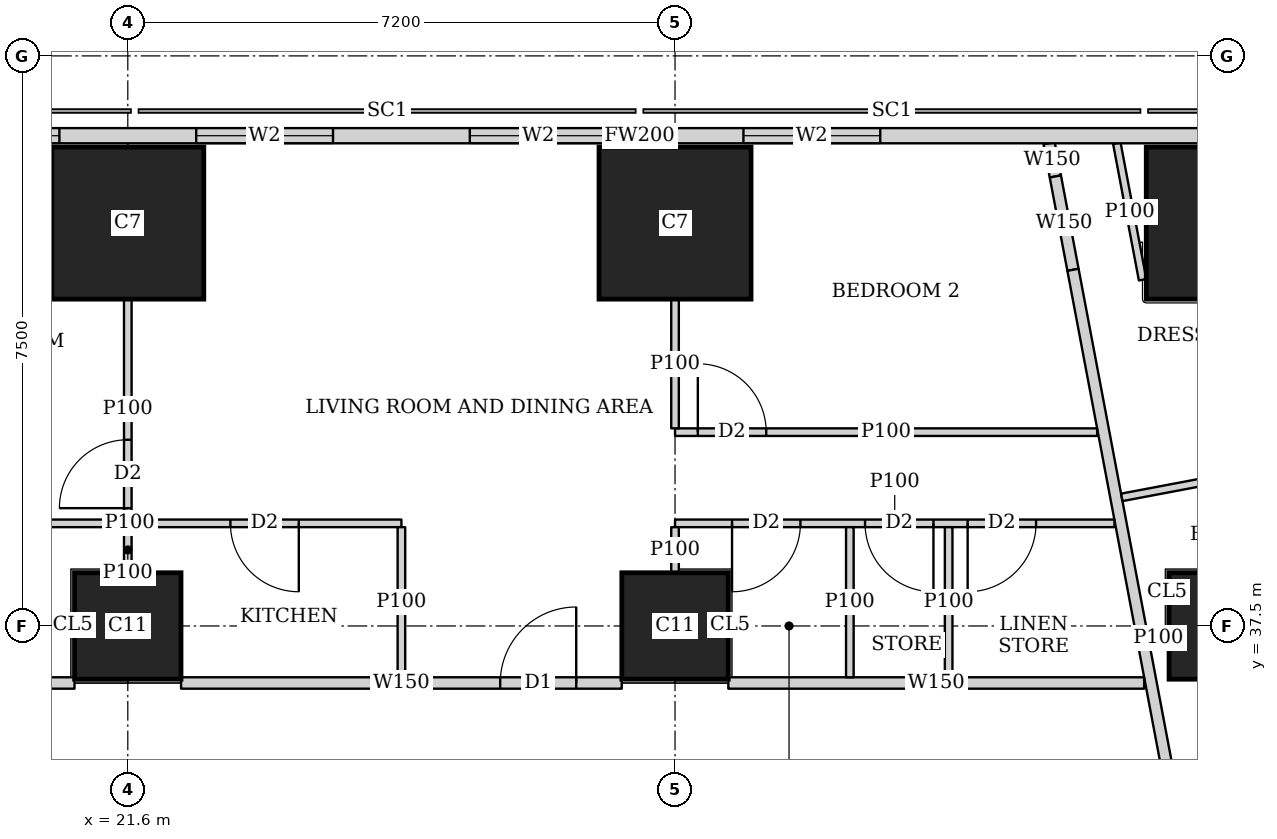
"""IFC4 building model, lengths in metres.
Left out: names, types, materials, properties, quantities, classifications, styles, units other than length and angle.
Written with IfcOpenShell. Run it as: python <this file> out.ifc"""

import sys

from ifc_helpers import new_model, si_unit, direction, frame, frame_2d, origin, origin_2d, place, context, subcontext, project, spatial, rectangle, extrude, element, fill, save


model = new_model("IFC4")
c1 = context("Model", 3, precision=1e-05, world=origin(), true_north=direction((0.0, 1.0)))
c2 = subcontext(c1, "Body", "Model", "MODEL_VIEW")
j1 = project(units=[si_unit("LENGTHUNIT", "METRE"), si_unit("PLANEANGLEUNIT", "RADIAN")], contexts=[c1])
p1 = place(None, origin())
s1 = spatial("IfcSite", under=j1, at=p1, CompositionType="ELEMENT")
p2 = place(p1, origin())
s2 = spatial("IfcBuilding", under=s1, at=p2, CompositionType="ELEMENT")
p3 = place(p2, frame((0.0, 0.0, 289.1)))
s3 = spatial("IfcBuildingStorey", under=s2, at=p3, CompositionType="ELEMENT", Elevation=289.1)
for number, where, z_axis, x_axis in (
    (1, (21.6, 37.5, 0.0), (0.0, 0.0, 1.0), (1.0, 0.0, 0.0)),
    (2, (28.8, 37.5, 0.0), (0.0, 0.0, 1.0), (1.0, 0.0, 0.0)),
    (3, (36.0, 37.5, 0.0), (0.0, 0.0, 1.0), (1.0, 0.0, 0.0)),
):
    element("IfcColumn", number, at=place(p3, frame(where, z_axis=z_axis, x_axis=x_axis)), inside=s3, PredefinedType="COLUMN", context=c2, shape_type="SweptSolid", body=[
        extrude(rectangle(XDim=1.4, YDim=1.4, at=origin_2d()), origin(), (0.0, 0.0, 1.0), 3.75),
    ])
for number, where, z_axis, x_axis in (
    (4, (21.6, 42.8, 0.0), (0.0, 0.0, 1.0), (1.0, 0.0, 0.0)),
    (5, (28.8, 42.8, 0.0), (0.0, 0.0, 1.0), (1.0, 0.0, 0.0)),
    (6, (36.0, 42.8, 0.0), (0.0, 0.0, 1.0), (1.0, 0.0, 0.0)),
):
    element("IfcColumn", number, at=place(p3, frame(where, z_axis=z_axis, x_axis=x_axis)), inside=s3, PredefinedType="COLUMN", context=c2, shape_type="SweptSolid", body=[
        extrude(rectangle(XDim=2.0, YDim=2.0, at=origin_2d()), origin(), (0.0, 0.0, 1.0), 3.75),
    ])
p4 = place(p3, frame((42.103, 43.95, 0.0), z_axis=(0.0, 0.0, 1.0), x_axis=(-1.0, 0.0, 0.0)))
e7 = element("IfcWall", 7, at=p4, inside=s3, PredefinedType="SOLIDWALL", context=c2, shape_type="SweptSolid", body=[
    extrude(rectangle(XDim=27.54, YDim=0.2, at=frame_2d((13.77, 0.0))), origin(), (0.0, 0.0, 1.0), 3.5),
])
p5 = place(p4, frame((10.603, 0.0, 0.9)))
e8 = element("IfcOpeningElement", 8, at=p5, cuts=e7, PredefinedType="OPENING", context=c2, shape_type="SweptSolid", body=[
    extrude(rectangle(XDim=1.8, YDim=1.5, at=frame_2d((0.9, 0.75))), frame((0.0, 0.11, 0.0), z_axis=(0.0, -1.0, 0.0), x_axis=(1.0, 0.0, 0.0)), (0.0, 0.0, 1.0), 0.22),
])
p6 = place(p4, frame((14.203, 0.0, 0.9)))
e9 = element("IfcOpeningElement", 9, at=p6, cuts=e7, PredefinedType="OPENING", context=c2, shape_type="SweptSolid", body=[
    extrude(rectangle(XDim=1.8, YDim=1.5, at=frame_2d((0.9, 0.75))), frame((0.0, 0.11, 0.0), z_axis=(0.0, -1.0, 0.0), x_axis=(1.0, 0.0, 0.0)), (0.0, 0.0, 1.0), 0.22),
])
p7 = place(p4, frame((17.803, 0.0, 0.9)))
e10 = element("IfcOpeningElement", 10, at=p7, cuts=e7, PredefinedType="OPENING", context=c2, shape_type="SweptSolid", body=[
    extrude(rectangle(XDim=1.8, YDim=1.5, at=frame_2d((0.9, 0.75))), frame((0.0, 0.11, 0.0), z_axis=(0.0, -1.0, 0.0), x_axis=(1.0, 0.0, 0.0)), (0.0, 0.0, 1.0), 0.22),
])
p8 = place(p4, frame((21.403, 0.0, 0.9)))
e11 = element("IfcOpeningElement", 11, at=p8, cuts=e7, PredefinedType="OPENING", context=c2, shape_type="SweptSolid", body=[
    extrude(rectangle(XDim=1.8, YDim=1.5, at=frame_2d((0.9, 0.75))), frame((0.0, 0.11, 0.0), z_axis=(0.0, -1.0, 0.0), x_axis=(1.0, 0.0, 0.0)), (0.0, 0.0, 1.0), 0.22),
])
p9 = place(p3, frame((16.001, 36.75, 0.0), z_axis=(0.0, 0.0, 1.0), x_axis=(1.0, 0.0, 0.0)))
e12 = element("IfcWall", 12, at=p9, inside=s3, PredefinedType="SOLIDWALL", context=c2, shape_type="SweptSolid", body=[
    extrude(rectangle(XDim=4.898, YDim=0.15, at=frame_2d((2.449, 0.0))), origin(), (0.0, 0.0, 1.0), 3.5),
])
p10 = place(p3, frame((22.301, 36.75, 0.0), z_axis=(0.0, 0.0, 1.0), x_axis=(1.0, 0.0, 0.0)))
e13 = element("IfcWall", 13, at=p10, inside=s3, PredefinedType="SOLIDWALL", context=c2, shape_type="SweptSolid", body=[
    extrude(rectangle(XDim=5.798, YDim=0.15, at=frame_2d((2.899, 0.0))), origin(), (0.0, 0.0, 1.0), 3.5),
])
p11 = place(p10, frame((4.199, 0.0, 0.0)))
e14 = element("IfcOpeningElement", 14, at=p11, cuts=e13, PredefinedType="OPENING", context=c2, shape_type="SweptSolid", body=[
    extrude(rectangle(XDim=1.0, YDim=2.1, at=frame_2d((0.5, 1.05))), frame((0.0, 0.085, 0.0), z_axis=(0.0, -1.0, 0.0), x_axis=(1.0, 0.0, 0.0)), (0.0, 0.0, 1.0), 0.17),
])
p12 = place(p3, frame((29.501, 36.75, 0.0), z_axis=(0.0, 0.0, 1.0), x_axis=(1.0, 0.0, 0.0)))
e15 = element("IfcWall", 15, at=p12, inside=s3, PredefinedType="SOLIDWALL", context=c2, shape_type="SweptSolid", body=[
    extrude(rectangle(XDim=5.471, YDim=0.15, at=frame_2d((2.735, 0.0))), origin(), (0.0, 0.0, 1.0), 3.5),
])
p13 = place(p3, frame((33.722, 43.85, 0.0), z_axis=(0.0, 0.0, 1.0), x_axis=(0.184886516626, -0.982759877066, 0.0)))
e16 = element("IfcWall", 16, at=p13, inside=s3, PredefinedType="SOLIDWALL", context=c2, shape_type="SweptSolid", body=[
    extrude(rectangle(XDim=0.444, YDim=0.15, at=frame_2d((0.222, 0.0))), origin(), (0.0, 0.0, 1.0), 3.5),
])
p14 = place(p3, frame((33.804, 43.414, 0.0), z_axis=(0.0, 0.0, 1.0), x_axis=(0.185585816539, -0.982628060204, 0.0)))
e17 = element("IfcWall", 17, at=p14, inside=s3, PredefinedType="SOLIDWALL", context=c2, shape_type="SweptSolid", body=[
    extrude(rectangle(XDim=1.25, YDim=0.15, at=frame_2d((0.625, 0.0))), origin(), (0.0, 0.0, 1.0), 2.05),
])
p15 = place(p3, frame((34.036, 42.186, 0.0), z_axis=(0.0, 0.0, 1.0), x_axis=(0.185593518645, -0.9826266055, 0.0)))
e18 = element("IfcWall", 18, at=p15, inside=s3, PredefinedType="SOLIDWALL", context=c2, shape_type="SweptSolid", body=[
    extrude(rectangle(XDim=35.961, YDim=0.15, at=frame_2d((17.98, 0.0))), origin(), (0.0, 0.0, 1.0), 2.5),
])
p16 = place(p15, frame((19.345, 0.0, 0.0)))
e19 = element("IfcOpeningElement", 19, at=p16, cuts=e18, PredefinedType="OPENING", context=c2, shape_type="SweptSolid", body=[
    extrude(rectangle(XDim=1.0, YDim=2.1, at=frame_2d((0.5, 1.05))), frame((0.0, 0.085, 0.0), z_axis=(0.0, -1.0, 0.0), x_axis=(1.0, 0.0, 0.0)), (0.0, 0.0, 1.0), 0.17),
])
p17 = place(p15, frame((33.774, 0.0, 0.0)))
e20 = element("IfcOpeningElement", 20, at=p17, cuts=e18, PredefinedType="OPENING", context=c2, shape_type="SweptSolid", body=[
    extrude(rectangle(XDim=1.0, YDim=2.1, at=frame_2d((0.5, 1.05))), frame((0.0, 0.085, 0.0), z_axis=(0.0, -1.0, 0.0), x_axis=(1.0, 0.0, 0.0)), (0.0, 0.0, 1.0), 0.17),
])
p18 = place(p3, frame((34.952, 42.055, 0.0), z_axis=(0.0, 0.0, 1.0), x_axis=(-0.185490642006, 0.98264603074, 0.0)))
e21 = element("IfcWall", 21, at=p18, inside=s3, PredefinedType="PARTITIONING", context=c2, shape_type="SweptSolid", body=[
    extrude(rectangle(XDim=1.827, YDim=0.1, at=frame_2d((0.914, 0.0))), origin(), (0.0, 0.0, 1.0), 2.05),
])
p19 = place(p3, frame((37.896, 39.8, 0.0), z_axis=(0.0, 0.0, 1.0), x_axis=(-0.982607026909, -0.185697147715, 0.0)))
e22 = element("IfcWall", 22, at=p19, inside=s3, PredefinedType="PARTITIONING", context=c2, shape_type="SweptSolid", body=[
    extrude(rectangle(XDim=3.275, YDim=0.1, at=frame_2d((1.637, 0.0))), origin(), (0.0, 0.0, 1.0), 3.5),
])
p20 = place(p3, frame((35.29, 37.366, 0.0), z_axis=(0.0, 0.0, 1.0), x_axis=(-0.982395465615, -0.18681313963, 0.0)))
e23 = element("IfcWall", 23, at=p20, inside=s3, PredefinedType="PARTITIONING", context=c2, shape_type="SweptSolid", body=[
    extrude(rectangle(XDim=0.263, YDim=0.1, at=frame_2d((0.131, 0.0))), origin(), (0.0, 0.0, 1.0), 3.5),
])
p21 = place(p3, frame((21.6, 38.9, 0.0), z_axis=(0.0, 0.0, 1.0), x_axis=(0.0, 1.0, 0.0)))
e24 = element("IfcWall", 24, at=p21, inside=s3, PredefinedType="PARTITIONING", context=c2, shape_type="SweptSolid", body=[
    extrude(rectangle(XDim=2.899, YDim=0.1, at=frame_2d((1.45, 0.0))), origin(), (0.0, 0.0, 1.0), 3.5),
])
p22 = place(p21, frame((0.15, 0.0, 0.0)))
e25 = element("IfcOpeningElement", 25, at=p22, cuts=e24, PredefinedType="OPENING", context=c2, shape_type="SweptSolid", body=[
    extrude(rectangle(XDim=0.9, YDim=2.1, at=frame_2d((0.45, 1.05))), frame((0.0, 0.06, 0.0), z_axis=(0.0, -1.0, 0.0), x_axis=(1.0, 0.0, 0.0)), (0.0, 0.0, 1.0), 0.12),
])
p23 = place(p3, frame((28.8, 40.1, 0.0), z_axis=(0.0, 0.0, 1.0), x_axis=(0.0, 1.0, 0.0)))
e26 = element("IfcWall", 26, at=p23, inside=s3, PredefinedType="PARTITIONING", context=c2, shape_type="SweptSolid", body=[
    extrude(rectangle(XDim=1.699, YDim=0.1, at=frame_2d((0.85, 0.0))), origin(), (0.0, 0.0, 1.0), 3.5),
])
p24 = place(p3, frame((21.6, 38.201, 0.0), z_axis=(0.0, 0.0, 1.0), x_axis=(0.0, 1.0, 0.0)))
e27 = element("IfcWall", 27, at=p24, inside=s3, PredefinedType="PARTITIONING", context=c2, shape_type="SweptSolid", body=[
    extrude(rectangle(XDim=0.599, YDim=0.1, at=frame_2d((0.3, 0.0))), origin(), (0.0, 0.0, 1.0), 3.5),
])
p25 = place(p3, frame((25.2, 36.825, 0.0), z_axis=(0.0, 0.0, 1.0), x_axis=(0.0, 1.0, 0.0)))
e28 = element("IfcWall", 28, at=p25, inside=s3, PredefinedType="PARTITIONING", context=c2, shape_type="SweptSolid", body=[
    extrude(rectangle(XDim=1.975, YDim=0.1, at=frame_2d((0.988, 0.0))), origin(), (0.0, 0.0, 1.0), 3.5),
])
p26 = place(p3, frame((28.8, 38.201, 0.0), z_axis=(0.0, 0.0, 1.0), x_axis=(0.0, 1.0, 0.0)))
e29 = element("IfcWall", 29, at=p26, inside=s3, PredefinedType="PARTITIONING", context=c2, shape_type="SweptSolid", body=[
    extrude(rectangle(XDim=0.599, YDim=0.1, at=frame_2d((0.3, 0.0))), origin(), (0.0, 0.0, 1.0), 3.5),
])
for number, where, z_axis, x_axis in (
    (30, (32.4, 36.825, 0.0), (0.0, 0.0, 1.0), (0.0, 1.0, 0.0)),
    (31, (31.1, 36.825, 0.0), (0.0, 0.0, 1.0), (0.0, 1.0, 0.0)),
):
    element("IfcWall", number, at=place(p3, frame(where, z_axis=z_axis, x_axis=x_axis)), inside=s3, PredefinedType="PARTITIONING", context=c2, shape_type="SweptSolid", body=[
        extrude(rectangle(XDim=1.975, YDim=0.1, at=frame_2d((0.988, 0.0))), origin(), (0.0, 0.0, 1.0), 3.5),
    ])
p27 = place(p3, frame((18.05, 38.85, 0.0), z_axis=(0.0, 0.0, 1.0), x_axis=(1.0, 0.0, 0.0)))
e32 = element("IfcWall", 32, at=p27, inside=s3, PredefinedType="PARTITIONING", context=c2, shape_type="SweptSolid", body=[
    extrude(rectangle(XDim=7.15, YDim=0.1, at=frame_2d((3.575, 0.0))), origin(), (0.0, 0.0, 1.0), 3.5),
])
p28 = place(p27, frame((1.3, 0.0, 0.0)))
e33 = element("IfcOpeningElement", 33, at=p28, cuts=e32, PredefinedType="OPENING", context=c2, shape_type="SweptSolid", body=[
    extrude(rectangle(XDim=0.9, YDim=2.1, at=frame_2d((0.45, 1.05))), frame((0.0, 0.06, 0.0), z_axis=(0.0, -1.0, 0.0), x_axis=(1.0, 0.0, 0.0)), (0.0, 0.0, 1.0), 0.12),
])
p29 = place(p27, frame((4.9, 0.0, 0.0)))
e34 = element("IfcOpeningElement", 34, at=p29, cuts=e32, PredefinedType="OPENING", context=c2, shape_type="SweptSolid", body=[
    extrude(rectangle(XDim=0.9, YDim=2.1, at=frame_2d((0.45, 1.05))), frame((0.0, 0.06, 0.0), z_axis=(0.0, -1.0, 0.0), x_axis=(1.0, 0.0, 0.0)), (0.0, 0.0, 1.0), 0.12),
])
p30 = place(p3, frame((28.8, 38.85, 0.0), z_axis=(0.0, 0.0, 1.0), x_axis=(1.0, 0.0, 0.0)))
e35 = element("IfcWall", 35, at=p30, inside=s3, PredefinedType="PARTITIONING", context=c2, shape_type="SweptSolid", body=[
    extrude(rectangle(XDim=5.781, YDim=0.1, at=frame_2d((2.891, 0.0))), origin(), (0.0, 0.0, 1.0), 3.5),
])
p31 = place(p30, frame((0.75, 0.0, 0.0)))
e36 = element("IfcOpeningElement", 36, at=p31, cuts=e35, PredefinedType="OPENING", context=c2, shape_type="SweptSolid", body=[
    extrude(rectangle(XDim=0.9, YDim=2.1, at=frame_2d((0.45, 1.05))), frame((0.0, 0.06, 0.0), z_axis=(0.0, -1.0, 0.0), x_axis=(1.0, 0.0, 0.0)), (0.0, 0.0, 1.0), 0.12),
])
p32 = place(p30, frame((2.5, 0.0, 0.0)))
e37 = element("IfcOpeningElement", 37, at=p32, cuts=e35, PredefinedType="OPENING", context=c2, shape_type="SweptSolid", body=[
    extrude(rectangle(XDim=0.9, YDim=2.1, at=frame_2d((0.45, 1.05))), frame((0.0, 0.06, 0.0), z_axis=(0.0, -1.0, 0.0), x_axis=(1.0, 0.0, 0.0)), (0.0, 0.0, 1.0), 0.12),
])
p33 = place(p30, frame((3.85, 0.0, 0.0)))
e38 = element("IfcOpeningElement", 38, at=p33, cuts=e35, PredefinedType="OPENING", context=c2, shape_type="SweptSolid", body=[
    extrude(rectangle(XDim=0.9, YDim=2.1, at=frame_2d((0.45, 1.05))), frame((0.0, 0.06, 0.0), z_axis=(0.0, -1.0, 0.0), x_axis=(1.0, 0.0, 0.0)), (0.0, 0.0, 1.0), 0.12),
])
p34 = place(p3, frame((28.8, 40.05, 0.0), z_axis=(0.0, 0.0, 1.0), x_axis=(1.0, 0.0, 0.0)))
e39 = element("IfcWall", 39, at=p34, inside=s3, PredefinedType="PARTITIONING", context=c2, shape_type="SweptSolid", body=[
    extrude(rectangle(XDim=5.554, YDim=0.1, at=frame_2d((2.777, 0.0))), origin(), (0.0, 0.0, 1.0), 3.5),
])
p35 = place(p34, frame((0.3, 0.0, 0.0)))
e40 = element("IfcOpeningElement", 40, at=p35, cuts=e39, PredefinedType="OPENING", context=c2, shape_type="SweptSolid", body=[
    extrude(rectangle(XDim=0.9, YDim=2.1, at=frame_2d((0.45, 1.05))), frame((0.0, 0.06, 0.0), z_axis=(0.0, -1.0, 0.0), x_axis=(1.0, 0.0, 0.0)), (0.0, 0.0, 1.0), 0.12),
])
p36 = place(p5, origin())
e41 = element("IfcWindow", 41, at=p36, inside=s3, PartitioningType="SINGLE_PANEL", PredefinedType="WINDOW", context=c2, shape_type="SweptSolid", body=[
    extrude(rectangle(XDim=1.8, YDim=1.5, at=frame_2d((0.9, 0.75))), frame((0.0, 0.03, 0.0), z_axis=(0.0, -1.0, 0.0), x_axis=(1.0, 0.0, 0.0)), (0.0, 0.0, 1.0), 0.06),
])
fill(e8, e41)
p37 = place(p6, origin())
e42 = element("IfcWindow", 42, at=p37, inside=s3, PartitioningType="SINGLE_PANEL", PredefinedType="WINDOW", context=c2, shape_type="SweptSolid", body=[
    extrude(rectangle(XDim=1.8, YDim=1.5, at=frame_2d((0.9, 0.75))), frame((0.0, 0.03, 0.0), z_axis=(0.0, -1.0, 0.0), x_axis=(1.0, 0.0, 0.0)), (0.0, 0.0, 1.0), 0.06),
])
fill(e9, e42)
p38 = place(p7, origin())
e43 = element("IfcWindow", 43, at=p38, inside=s3, PartitioningType="SINGLE_PANEL", PredefinedType="WINDOW", context=c2, shape_type="SweptSolid", body=[
    extrude(rectangle(XDim=1.8, YDim=1.5, at=frame_2d((0.9, 0.75))), frame((0.0, 0.03, 0.0), z_axis=(0.0, -1.0, 0.0), x_axis=(1.0, 0.0, 0.0)), (0.0, 0.0, 1.0), 0.06),
])
fill(e10, e43)
p39 = place(p8, origin())
e44 = element("IfcWindow", 44, at=p39, inside=s3, PartitioningType="SINGLE_PANEL", PredefinedType="WINDOW", context=c2, shape_type="SweptSolid", body=[
    extrude(rectangle(XDim=1.8, YDim=1.5, at=frame_2d((0.9, 0.75))), frame((0.0, 0.03, 0.0), z_axis=(0.0, -1.0, 0.0), x_axis=(1.0, 0.0, 0.0)), (0.0, 0.0, 1.0), 0.06),
])
fill(e11, e44)
p40 = place(p22, origin())
e45 = element("IfcDoor", 45, at=p40, inside=s3, OperationType="SINGLE_SWING_LEFT", PredefinedType="DOOR", context=c2, shape_type="SweptSolid", body=[
    extrude(rectangle(XDim=0.9, YDim=2.1, at=frame_2d((0.45, 1.05))), frame((0.0, 0.025, 0.0), z_axis=(0.0, -1.0, 0.0), x_axis=(1.0, 0.0, 0.0)), (0.0, 0.0, 1.0), 0.05),
])
fill(e25, e45)
p41 = place(p29, origin())
e46 = element("IfcDoor", 46, at=p41, inside=s3, OperationType="SINGLE_SWING_LEFT", PredefinedType="DOOR", context=c2, shape_type="SweptSolid", body=[
    extrude(rectangle(XDim=0.9, YDim=2.1, at=frame_2d((0.45, 1.05))), frame((0.0, 0.025, 0.0), z_axis=(0.0, -1.0, 0.0), x_axis=(1.0, 0.0, 0.0)), (0.0, 0.0, 1.0), 0.05),
])
fill(e34, e46)
p42 = place(p35, origin())
e47 = element("IfcDoor", 47, at=p42, inside=s3, OperationType="SINGLE_SWING_LEFT", PredefinedType="DOOR", context=c2, shape_type="SweptSolid", body=[
    extrude(rectangle(XDim=0.9, YDim=2.1, at=frame_2d((0.45, 1.05))), frame((0.0, 0.025, 0.0), z_axis=(0.0, -1.0, 0.0), x_axis=(1.0, 0.0, 0.0)), (0.0, 0.0, 1.0), 0.05),
])
fill(e40, e47)
p43 = place(p31, origin())
e48 = element("IfcDoor", 48, at=p43, inside=s3, OperationType="SINGLE_SWING_RIGHT", PredefinedType="DOOR", context=c2, shape_type="SweptSolid", body=[
    extrude(rectangle(XDim=0.9, YDim=2.1, at=frame_2d((0.45, 1.05))), frame((0.0, 0.025, 0.0), z_axis=(0.0, -1.0, 0.0), x_axis=(1.0, 0.0, 0.0)), (0.0, 0.0, 1.0), 0.05),
])
fill(e36, e48)
p44 = place(p32, origin())
e49 = element("IfcDoor", 49, at=p44, inside=s3, OperationType="SINGLE_SWING_LEFT", PredefinedType="DOOR", context=c2, shape_type="SweptSolid", body=[
    extrude(rectangle(XDim=0.9, YDim=2.1, at=frame_2d((0.45, 1.05))), frame((0.0, 0.025, 0.0), z_axis=(0.0, -1.0, 0.0), x_axis=(1.0, 0.0, 0.0)), (0.0, 0.0, 1.0), 0.05),
])
fill(e37, e49)
p45 = place(p33, origin())
e50 = element("IfcDoor", 50, at=p45, inside=s3, OperationType="SINGLE_SWING_RIGHT", PredefinedType="DOOR", context=c2, shape_type="SweptSolid", body=[
    extrude(rectangle(XDim=0.9, YDim=2.1, at=frame_2d((0.45, 1.05))), frame((0.0, 0.025, 0.0), z_axis=(0.0, -1.0, 0.0), x_axis=(1.0, 0.0, 0.0)), (0.0, 0.0, 1.0), 0.05),
])
fill(e38, e50)
p46 = place(p11, origin())
e51 = element("IfcDoor", 51, at=p46, inside=s3, OperationType="SINGLE_SWING_RIGHT", PredefinedType="DOOR", context=c2, shape_type="SweptSolid", body=[
    extrude(rectangle(XDim=1.0, YDim=2.1, at=frame_2d((0.5, 1.05))), frame((0.0, 0.025, 0.0), z_axis=(0.0, -1.0, 0.0), x_axis=(1.0, 0.0, 0.0)), (0.0, 0.0, 1.0), 0.05),
])
fill(e14, e51)
save(model, sys.argv[1])
